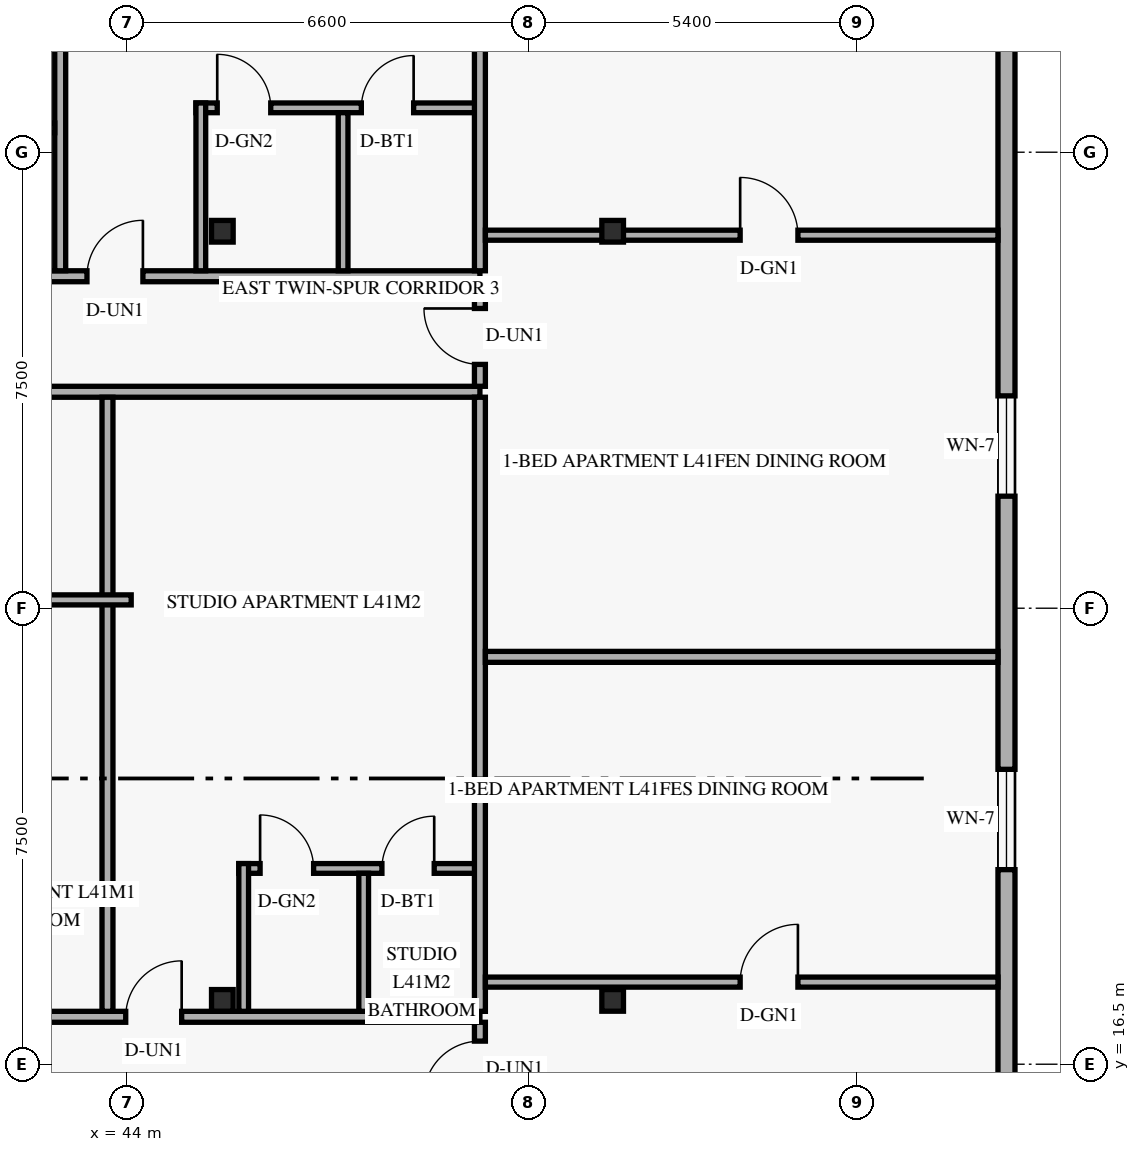
"""IFC4 building model, lengths in metres.
Left out: names, types, materials, properties, quantities, classifications, styles, units other than length and angle.
Written with IfcOpenShell. Run it as: python <this file> out.ifc"""

import sys

from ifc_helpers import new_model, si_unit, direction, frame, frame_2d, origin, origin_2d, place, context, subcontext, project, spatial, rectangle, hollow_rectangle, extrude, element, fill, save


model = new_model("IFC4")
c1 = context("Model", 3, precision=1e-05, world=origin(), true_north=direction((0.0, 1.0)))
c2 = subcontext(c1, "Body", "Model", "MODEL_VIEW")
j1 = project(units=[si_unit("LENGTHUNIT", "METRE"), si_unit("PLANEANGLEUNIT", "RADIAN")], contexts=[c1])
p1 = place(None, origin())
s1 = spatial("IfcSite", under=j1, at=p1, CompositionType="ELEMENT")
p2 = place(p1, origin())
s2 = spatial("IfcBuilding", under=s1, at=p2, CompositionType="ELEMENT")
p3 = place(p2, frame((0.0, 0.0, 159.0)))
s3 = spatial("IfcBuildingStorey", under=s2, at=p3, CompositionType="ELEMENT", Elevation=159.0)
for number, where, z_axis, x_axis in (
    (1, (45.501, 17.55, 0.0), (0.035, 0.0, 0.999), (0.0, 1.0, 0.0)),
    (2, (45.501, 30.2, 0.0), (0.035, 0.0, 0.999), (0.0, 1.0, 0.0)),
):
    element("IfcColumn", number, at=place(p3, frame(where, z_axis=z_axis, x_axis=x_axis)), inside=s3, PredefinedType="COLUMN", context=c2, shape_type="SweptSolid", body=[
        extrude(hollow_rectangle(XDim=0.356, YDim=0.356, WallThickness=0.016, at=origin_2d()), origin(), (0.0, 0.0, 1.0), 3.602),
    ])
for number, where, z_axis, x_axis in (
    (3, (51.879, 17.55, 0.0), (0.058, 0.0, 0.998), (0.0, 1.0, 0.0)),
    (4, (51.879, 30.2, 0.0), (0.058, 0.0, 0.998), (0.0, 1.0, 0.0)),
):
    element("IfcColumn", number, at=place(p3, frame(where, z_axis=z_axis, x_axis=x_axis)), inside=s3, PredefinedType="COLUMN", context=c2, shape_type="SweptSolid", body=[
        extrude(hollow_rectangle(XDim=0.356, YDim=0.356, WallThickness=0.016, at=origin_2d()), origin(), (0.0, 0.0, 1.0), 3.606),
    ])
p4 = place(p3, frame((58.46, 7.62, 0.0), z_axis=(0.0, 0.0, 1.0), x_axis=(0.0, 1.0, 0.0)))
e5 = element("IfcWall", 5, at=p4, inside=s3, PredefinedType="SOLIDWALL", context=c2, shape_type="SweptSolid", body=[
    extrude(rectangle(XDim=32.76, YDim=0.28, at=frame_2d((16.38, 0.0))), origin(), (0.0, 0.0, 1.0), 3.36),
])
p5 = place(p4, frame((4.29, 0.0, 0.85)))
e6 = element("IfcOpeningElement", 6, at=p5, cuts=e5, PredefinedType="OPENING", context=c2, shape_type="SweptSolid", body=[
    extrude(rectangle(XDim=1.65, YDim=1.6, at=frame_2d((0.825, 0.8))), frame((0.0, 0.15, 0.0), z_axis=(0.0, -1.0, 0.0), x_axis=(1.0, 0.0, 0.0)), (0.0, 0.0, 1.0), 0.3),
])
p6 = place(p4, frame((12.08, 0.0, 0.85)))
e7 = element("IfcOpeningElement", 7, at=p6, cuts=e5, PredefinedType="OPENING", context=c2, shape_type="SweptSolid", body=[
    extrude(rectangle(XDim=1.65, YDim=1.6, at=frame_2d((0.825, 0.8))), frame((0.0, 0.15, 0.0), z_axis=(0.0, -1.0, 0.0), x_axis=(1.0, 0.0, 0.0)), (0.0, 0.0, 1.0), 0.3),
])
p7 = place(p4, frame((18.223, 0.0, 0.85)))
e8 = element("IfcOpeningElement", 8, at=p7, cuts=e5, PredefinedType="OPENING", context=c2, shape_type="SweptSolid", body=[
    extrude(rectangle(XDim=1.65, YDim=1.6, at=frame_2d((0.825, 0.8))), frame((0.0, 0.15, 0.0), z_axis=(0.0, -1.0, 0.0), x_axis=(1.0, 0.0, 0.0)), (0.0, 0.0, 1.0), 0.3),
])
p8 = place(p4, frame((26.812, 0.0, 0.85)))
e9 = element("IfcOpeningElement", 9, at=p8, cuts=e5, PredefinedType="OPENING", context=c2, shape_type="SweptSolid", body=[
    extrude(rectangle(XDim=1.65, YDim=1.6, at=frame_2d((0.825, 0.8))), frame((0.0, 0.15, 0.0), z_axis=(0.0, -1.0, 0.0), x_axis=(1.0, 0.0, 0.0)), (0.0, 0.0, 1.0), 0.3),
])
p9 = place(p3, frame((37.64, 17.28, 0.0), z_axis=(0.0, 0.0, 1.0), x_axis=(1.0, 0.0, 0.0)))
e10 = element("IfcWall", 10, at=p9, inside=s3, PredefinedType="STANDARD", context=c2, shape_type="SweptSolid", body=[
    extrude(rectangle(XDim=12.16, YDim=0.18, at=frame_2d((6.08, 0.0))), origin(), (0.0, 0.0, 1.0), 2.73),
])
p10 = place(p9, frame((6.335, 0.0, 0.0)))
e11 = element("IfcOpeningElement", 11, at=p10, cuts=e10, PredefinedType="OPENING", context=c2, shape_type="SweptSolid", body=[
    extrude(rectangle(XDim=0.92, YDim=2.15, at=frame_2d((0.46, 1.075))), frame((0.0, 0.1, 0.0), z_axis=(0.0, -1.0, 0.0), x_axis=(1.0, 0.0, 0.0)), (0.0, 0.0, 1.0), 0.2),
])
p11 = place(p3, frame((37.64, 27.56, 0.0), z_axis=(0.0, 0.0, 1.0), x_axis=(1.0, 0.0, 0.0)))
e12 = element("IfcWall", 12, at=p11, inside=s3, PredefinedType="STANDARD", context=c2, shape_type="SweptSolid", body=[
    extrude(rectangle(XDim=12.16, YDim=0.18, at=frame_2d((6.08, 0.0))), origin(), (0.0, 0.0, 1.0), 2.73),
])
p12 = place(p3, frame((35.51, 29.46, 0.0), z_axis=(0.0, 0.0, 1.0), x_axis=(1.0, 0.0, 0.0)))
e13 = element("IfcWall", 13, at=p12, inside=s3, PredefinedType="STANDARD", context=c2, shape_type="SweptSolid", body=[
    extrude(rectangle(XDim=14.29, YDim=0.18, at=frame_2d((7.145, 0.0))), origin(), (0.0, 0.0, 1.0), 2.73),
])
p13 = place(p12, frame((0.35, 0.0, 0.0)))
e14 = element("IfcOpeningElement", 14, at=p13, cuts=e13, PredefinedType="OPENING", context=c2, shape_type="SweptSolid", body=[
    extrude(rectangle(XDim=0.92, YDim=2.15, at=frame_2d((0.46, 1.075))), frame((0.0, 0.1, 0.0), z_axis=(0.0, -1.0, 0.0), x_axis=(1.0, 0.0, 0.0)), (0.0, 0.0, 1.0), 0.2),
])
p14 = place(p12, frame((7.828, 0.0, 0.0)))
e15 = element("IfcOpeningElement", 15, at=p14, cuts=e13, PredefinedType="OPENING", context=c2, shape_type="SweptSolid", body=[
    extrude(rectangle(XDim=0.92, YDim=2.15, at=frame_2d((0.46, 1.075))), frame((0.0, 0.1, 0.0), z_axis=(0.0, -1.0, 0.0), x_axis=(1.0, 0.0, 0.0)), (0.0, 0.0, 1.0), 0.2),
])
p15 = place(p3, frame((42.898, 29.55, 0.0), z_axis=(0.0, 0.0, 1.0), x_axis=(0.0, 1.0, 0.0)))
e16 = element("IfcWall", 16, at=p15, inside=s3, PredefinedType="PARTITIONING", context=c2, shape_type="SweptSolid", body=[
    extrude(rectangle(XDim=14.17, YDim=0.18, at=frame_2d((7.085, 0.0))), origin(), (0.0, 0.0, 1.0), 2.73),
])
p16 = place(p3, frame((38.228, 31.9, 0.0), z_axis=(0.0, 0.0, 1.0), x_axis=(1.0, 0.0, 0.0)))
e17 = element("IfcWall", 17, at=p16, inside=s3, PredefinedType="PLUMBINGWALL", context=c2, shape_type="SweptSolid", body=[
    extrude(rectangle(XDim=4.58, YDim=0.16, at=frame_2d((2.29, 0.0))), origin(), (0.0, 0.0, 1.0), 3.36),
])
p17 = place(p16, frame((0.35, 0.0, 0.0)))
e18 = element("IfcOpeningElement", 18, at=p17, cuts=e17, PredefinedType="OPENING", context=c2, shape_type="SweptSolid", body=[
    extrude(rectangle(XDim=0.88, YDim=2.12, at=frame_2d((0.44, 1.06))), frame((0.0, 0.09, 0.0), z_axis=(0.0, -1.0, 0.0), x_axis=(1.0, 0.0, 0.0)), (0.0, 0.0, 1.0), 0.18),
])
p18 = place(p16, frame((2.72, 0.0, 0.0)))
e19 = element("IfcOpeningElement", 19, at=p18, cuts=e17, PredefinedType="OPENING", context=c2, shape_type="SweptSolid", body=[
    extrude(rectangle(XDim=0.86, YDim=2.12, at=frame_2d((0.43, 1.06))), frame((0.0, 0.09, 0.0), z_axis=(0.0, -1.0, 0.0), x_axis=(1.0, 0.0, 0.0)), (0.0, 0.0, 1.0), 0.18),
])
p19 = place(p3, frame((45.13, 32.23, 0.0), z_axis=(0.0, 0.0, 1.0), x_axis=(1.0, 0.0, 0.0)))
e20 = element("IfcWall", 20, at=p19, inside=s3, PredefinedType="PLUMBINGWALL", context=c2, shape_type="SweptSolid", body=[
    extrude(rectangle(XDim=4.67, YDim=0.16, at=frame_2d((2.335, 0.0))), origin(), (0.0, 0.0, 1.0), 2.73),
])
p20 = place(p19, frame((0.35, 0.0, 0.0)))
e21 = element("IfcOpeningElement", 21, at=p20, cuts=e20, PredefinedType="OPENING", context=c2, shape_type="SweptSolid", body=[
    extrude(rectangle(XDim=0.88, YDim=2.12, at=frame_2d((0.44, 1.06))), frame((0.0, 0.09, 0.0), z_axis=(0.0, -1.0, 0.0), x_axis=(1.0, 0.0, 0.0)), (0.0, 0.0, 1.0), 0.18),
])
p21 = place(p19, frame((2.72, 0.0, 0.0)))
e22 = element("IfcOpeningElement", 22, at=p21, cuts=e20, PredefinedType="OPENING", context=c2, shape_type="SweptSolid", body=[
    extrude(rectangle(XDim=0.86, YDim=2.12, at=frame_2d((0.43, 1.06))), frame((0.0, 0.09, 0.0), z_axis=(0.0, -1.0, 0.0), x_axis=(1.0, 0.0, 0.0)), (0.0, 0.0, 1.0), 0.18),
])
p22 = place(p3, frame((45.21, 29.55, 0.0), z_axis=(0.0, 0.0, 1.0), x_axis=(0.0, 1.0, 0.0)))
e23 = element("IfcWall", 23, at=p22, inside=s3, PredefinedType="PLUMBINGWALL", context=c2, shape_type="SweptSolid", body=[
    extrude(rectangle(XDim=2.76, YDim=0.16, at=frame_2d((1.38, 0.0))), origin(), (0.0, 0.0, 1.0), 2.73),
])
p23 = place(p3, frame((47.55, 29.55, 0.0), z_axis=(0.0, 0.0, 1.0), x_axis=(0.0, 1.0, 0.0)))
e24 = element("IfcWall", 24, at=p23, inside=s3, PredefinedType="PLUMBINGWALL", context=c2, shape_type="SweptSolid", body=[
    extrude(rectangle(XDim=2.6, YDim=0.16, at=frame_2d((1.3, 0.0))), origin(), (0.0, 0.0, 1.0), 2.73),
])
p24 = place(p3, frame((43.675, 17.37, 0.0), z_axis=(0.0, 0.0, 1.0), x_axis=(0.0, 1.0, 0.0)))
e25 = element("IfcWall", 25, at=p24, inside=s3, PredefinedType="PARTITIONING", context=c2, shape_type="SweptSolid", body=[
    extrude(rectangle(XDim=10.1, YDim=0.18, at=frame_2d((5.05, 0.0))), origin(), (0.0, 0.0, 1.0), 2.73),
])
p25 = place(p3, frame((37.64, 24.137, 0.0), z_axis=(0.0, 0.0, 1.0), x_axis=(1.0, 0.0, 0.0)))
e26 = element("IfcWall", 26, at=p25, inside=s3, PredefinedType="PARTITIONING", context=c2, shape_type="SweptSolid", body=[
    extrude(rectangle(XDim=6.425, YDim=0.165, at=frame_2d((3.212, 0.0))), origin(), (0.0, 0.0, 1.0), 3.36),
])
p26 = place(p25, frame((4.004, 0.0, 0.0)))
e27 = element("IfcOpeningElement", 27, at=p26, cuts=e26, PredefinedType="OPENING", context=c2, shape_type="SweptSolid", body=[
    extrude(rectangle(XDim=0.9, YDim=2.14, at=frame_2d((0.45, 1.07))), frame((0.0, 0.093, 0.0), z_axis=(0.0, -1.0, 0.0), x_axis=(1.0, 0.0, 0.0)), (0.0, 0.0, 1.0), 0.185),
])
p27 = place(p3, frame((45.835, 19.72, 0.0), z_axis=(0.0, 0.0, 1.0), x_axis=(1.0, 0.0, 0.0)))
e28 = element("IfcWall", 28, at=p27, inside=s3, PredefinedType="PLUMBINGWALL", context=c2, shape_type="SweptSolid", body=[
    extrude(rectangle(XDim=3.965, YDim=0.16, at=frame_2d((1.982, 0.0))), origin(), (0.0, 0.0, 1.0), 3.36),
])
p28 = place(p27, frame((0.35, 0.0, 0.0)))
e29 = element("IfcOpeningElement", 29, at=p28, cuts=e28, PredefinedType="OPENING", context=c2, shape_type="SweptSolid", body=[
    extrude(rectangle(XDim=0.88, YDim=2.12, at=frame_2d((0.44, 1.06))), frame((0.0, 0.09, 0.0), z_axis=(0.0, -1.0, 0.0), x_axis=(1.0, 0.0, 0.0)), (0.0, 0.0, 1.0), 0.18),
])
p29 = place(p27, frame((2.354, 0.0, 0.0)))
e30 = element("IfcOpeningElement", 30, at=p29, cuts=e28, PredefinedType="OPENING", context=c2, shape_type="SweptSolid", body=[
    extrude(rectangle(XDim=0.86, YDim=2.12, at=frame_2d((0.43, 1.06))), frame((0.0, 0.09, 0.0), z_axis=(0.0, -1.0, 0.0), x_axis=(1.0, 0.0, 0.0)), (0.0, 0.0, 1.0), 0.18),
])
p30 = place(p3, frame((45.915, 17.37, 0.0), z_axis=(0.0, 0.0, 1.0), x_axis=(0.0, 1.0, 0.0)))
e31 = element("IfcWall", 31, at=p30, inside=s3, PredefinedType="PLUMBINGWALL", context=c2, shape_type="SweptSolid", body=[
    extrude(rectangle(XDim=2.43, YDim=0.16, at=frame_2d((1.215, 0.0))), origin(), (0.0, 0.0, 1.0), 2.73),
])
p31 = place(p3, frame((47.888, 17.37, 0.0), z_axis=(0.0, 0.0, 1.0), x_axis=(0.0, 1.0, 0.0)))
e32 = element("IfcWall", 32, at=p31, inside=s3, PredefinedType="PLUMBINGWALL", context=c2, shape_type="SweptSolid", body=[
    extrude(rectangle(XDim=2.27, YDim=0.16, at=frame_2d((1.135, 0.0))), origin(), (0.0, 0.0, 1.0), 2.73),
])
p32 = place(p3, frame((49.8, 15.67, 0.0), z_axis=(0.0, 0.0, 1.0), x_axis=(0.0, 1.0, 0.0)))
e33 = element("IfcWall", 33, at=p32, inside=s3, PredefinedType="STANDARD", context=c2, shape_type="SweptSolid", body=[
    extrude(rectangle(XDim=1.52, YDim=0.18, at=frame_2d((0.76, 0.0))), origin(), (0.0, 0.0, 1.0), 3.36),
])
p33 = place(p32, frame((0.29, 0.0, 0.0)))
e34 = element("IfcOpeningElement", 34, at=p33, cuts=e33, PredefinedType="OPENING", context=c2, shape_type="SweptSolid", body=[
    extrude(rectangle(XDim=0.92, YDim=2.15, at=frame_2d((0.46, 1.075))), frame((0.0, 0.1, 0.0), z_axis=(0.0, -1.0, 0.0), x_axis=(1.0, 0.0, 0.0)), (0.0, 0.0, 1.0), 0.2),
])
p34 = place(p3, frame((49.8, 27.65, 0.0), z_axis=(0.0, 0.0, 1.0), x_axis=(0.0, 1.0, 0.0)))
e35 = element("IfcWall", 35, at=p34, inside=s3, PredefinedType="STANDARD", context=c2, shape_type="SweptSolid", body=[
    extrude(rectangle(XDim=1.72, YDim=0.18, at=frame_2d((0.86, 0.0))), origin(), (0.0, 0.0, 1.0), 3.36),
])
p35 = place(p34, frame((0.36, 0.0, 0.0)))
e36 = element("IfcOpeningElement", 36, at=p35, cuts=e35, PredefinedType="OPENING", context=c2, shape_type="SweptSolid", body=[
    extrude(rectangle(XDim=0.92, YDim=2.15, at=frame_2d((0.46, 1.075))), frame((0.0, 0.1, 0.0), z_axis=(0.0, -1.0, 0.0), x_axis=(1.0, 0.0, 0.0)), (0.0, 0.0, 1.0), 0.2),
])
p36 = place(p3, frame((49.8, 17.37, 0.0), z_axis=(0.0, 0.0, 1.0), x_axis=(0.0, 1.0, 0.0)))
e37 = element("IfcWall", 37, at=p36, inside=s3, PredefinedType="PARTITIONING", context=c2, shape_type="SweptSolid", body=[
    extrude(rectangle(XDim=10.1, YDim=0.18, at=frame_2d((5.05, 0.0))), origin(), (0.0, 0.0, 1.0), 2.73),
])
p37 = place(p3, frame((49.8, 29.55, 0.0), z_axis=(0.0, 0.0, 1.0), x_axis=(0.0, 1.0, 0.0)))
e38 = element("IfcWall", 38, at=p37, inside=s3, PredefinedType="PARTITIONING", context=c2, shape_type="SweptSolid", body=[
    extrude(rectangle(XDim=14.17, YDim=0.18, at=frame_2d((7.085, 0.0))), origin(), (0.0, 0.0, 1.0), 2.73),
])
p38 = place(p3, frame((49.89, 23.2, 0.0), z_axis=(0.0, 0.0, 1.0), x_axis=(1.0, 0.0, 0.0)))
e39 = element("IfcWall", 39, at=p38, inside=s3, PredefinedType="PARTITIONING", context=c2, shape_type="SweptSolid", body=[
    extrude(rectangle(XDim=8.43, YDim=0.18, at=frame_2d((4.215, 0.0))), origin(), (0.0, 0.0, 1.0), 2.879),
])
p39 = place(p3, frame((49.89, 17.851, 0.0), z_axis=(0.0, 0.0, 1.0), x_axis=(1.0, 0.0, 0.0)))
e40 = element("IfcWall", 40, at=p39, inside=s3, PredefinedType="PARTITIONING", context=c2, shape_type="SweptSolid", body=[
    extrude(rectangle(XDim=8.43, YDim=0.165, at=frame_2d((4.215, 0.0))), origin(), (0.0, 0.0, 1.0), 2.879),
])
p40 = place(p39, frame((4.19, 0.0, 0.0)))
e41 = element("IfcOpeningElement", 41, at=p40, cuts=e40, PredefinedType="OPENING", context=c2, shape_type="SweptSolid", body=[
    extrude(rectangle(XDim=0.95, YDim=2.15, at=frame_2d((0.475, 1.075))), frame((0.0, 0.093, 0.0), z_axis=(0.0, -1.0, 0.0), x_axis=(1.0, 0.0, 0.0)), (0.0, 0.0, 1.0), 0.185),
])
p41 = place(p3, frame((49.89, 30.135, 0.0), z_axis=(0.0, 0.0, 1.0), x_axis=(1.0, 0.0, 0.0)))
e42 = element("IfcWall", 42, at=p41, inside=s3, PredefinedType="PARTITIONING", context=c2, shape_type="SweptSolid", body=[
    extrude(rectangle(XDim=8.43, YDim=0.165, at=frame_2d((4.215, 0.0))), origin(), (0.0, 0.0, 1.0), 2.73),
])
p42 = place(p41, frame((4.19, 0.0, 0.0)))
e43 = element("IfcOpeningElement", 43, at=p42, cuts=e42, PredefinedType="OPENING", context=c2, shape_type="SweptSolid", body=[
    extrude(rectangle(XDim=0.95, YDim=2.15, at=frame_2d((0.475, 1.075))), frame((0.0, 0.093, 0.0), z_axis=(0.0, -1.0, 0.0), x_axis=(1.0, 0.0, 0.0)), (0.0, 0.0, 1.0), 0.185),
])
p43 = place(p6, origin())
e44 = element("IfcWindow", 44, at=p43, inside=s3, PartitioningType="SINGLE_PANEL", PredefinedType="WINDOW", context=c2, shape_type="SweptSolid", body=[
    extrude(rectangle(XDim=1.65, YDim=1.6, at=frame_2d((0.825, 0.8))), frame((0.0, 0.03, 0.0), z_axis=(0.0, -1.0, 0.0), x_axis=(1.0, 0.0, 0.0)), (0.0, 0.0, 1.0), 0.06),
])
fill(e7, e44)
p44 = place(p7, origin())
e45 = element("IfcWindow", 45, at=p44, inside=s3, PartitioningType="SINGLE_PANEL", PredefinedType="WINDOW", context=c2, shape_type="SweptSolid", body=[
    extrude(rectangle(XDim=1.65, YDim=1.6, at=frame_2d((0.825, 0.8))), frame((0.0, 0.03, 0.0), z_axis=(0.0, -1.0, 0.0), x_axis=(1.0, 0.0, 0.0)), (0.0, 0.0, 1.0), 0.06),
])
fill(e8, e45)
p45 = place(p14, origin())
e46 = element("IfcDoor", 46, at=p45, inside=s3, OperationType="SINGLE_SWING_RIGHT", PredefinedType="DOOR", context=c2, shape_type="SweptSolid", body=[
    extrude(rectangle(XDim=0.92, YDim=2.15, at=frame_2d((0.46, 1.075))), frame((0.0, 0.025, 0.0), z_axis=(0.0, -1.0, 0.0), x_axis=(1.0, 0.0, 0.0)), (0.0, 0.0, 1.0), 0.05),
])
fill(e15, e46)
p46 = place(p20, origin())
e47 = element("IfcDoor", 47, at=p46, inside=s3, OperationType="SINGLE_SWING_LEFT", PredefinedType="DOOR", context=c2, shape_type="SweptSolid", body=[
    extrude(rectangle(XDim=0.88, YDim=2.12, at=frame_2d((0.44, 1.06))), frame((0.0, 0.025, 0.0), z_axis=(0.0, -1.0, 0.0), x_axis=(1.0, 0.0, 0.0)), (0.0, 0.0, 1.0), 0.05),
])
fill(e21, e47)
p47 = place(p21, origin())
e48 = element("IfcDoor", 48, at=p47, inside=s3, OperationType="SINGLE_SWING_RIGHT", PredefinedType="DOOR", context=c2, shape_type="SweptSolid", body=[
    extrude(rectangle(XDim=0.86, YDim=2.12, at=frame_2d((0.43, 1.06))), frame((0.0, 0.025, 0.0), z_axis=(0.0, -1.0, 0.0), x_axis=(1.0, 0.0, 0.0)), (0.0, 0.0, 1.0), 0.05),
])
fill(e22, e48)
p48 = place(p10, origin())
e49 = element("IfcDoor", 49, at=p48, inside=s3, OperationType="SINGLE_SWING_RIGHT", PredefinedType="DOOR", context=c2, shape_type="SweptSolid", body=[
    extrude(rectangle(XDim=0.92, YDim=2.15, at=frame_2d((0.46, 1.075))), frame((0.0, 0.025, 0.0), z_axis=(0.0, -1.0, 0.0), x_axis=(1.0, 0.0, 0.0)), (0.0, 0.0, 1.0), 0.05),
])
fill(e11, e49)
p49 = place(p28, origin())
e50 = element("IfcDoor", 50, at=p49, inside=s3, OperationType="SINGLE_SWING_LEFT", PredefinedType="DOOR", context=c2, shape_type="SweptSolid", body=[
    extrude(rectangle(XDim=0.88, YDim=2.12, at=frame_2d((0.44, 1.06))), frame((0.0, 0.025, 0.0), z_axis=(0.0, -1.0, 0.0), x_axis=(1.0, 0.0, 0.0)), (0.0, 0.0, 1.0), 0.05),
])
fill(e29, e50)
p50 = place(p29, origin())
e51 = element("IfcDoor", 51, at=p50, inside=s3, OperationType="SINGLE_SWING_RIGHT", PredefinedType="DOOR", context=c2, shape_type="SweptSolid", body=[
    extrude(rectangle(XDim=0.86, YDim=2.12, at=frame_2d((0.43, 1.06))), frame((0.0, 0.025, 0.0), z_axis=(0.0, -1.0, 0.0), x_axis=(1.0, 0.0, 0.0)), (0.0, 0.0, 1.0), 0.05),
])
fill(e30, e51)
p51 = place(p40, origin())
e52 = element("IfcDoor", 52, at=p51, inside=s3, OperationType="SINGLE_SWING_RIGHT", PredefinedType="DOOR", context=c2, shape_type="SweptSolid", body=[
    extrude(rectangle(XDim=0.95, YDim=2.15, at=frame_2d((0.475, 1.075))), frame((0.0, 0.025, 0.0), z_axis=(0.0, -1.0, 0.0), x_axis=(1.0, 0.0, 0.0)), (0.0, 0.0, 1.0), 0.05),
])
fill(e41, e52)
p52 = place(p33, origin())
e53 = element("IfcDoor", 53, at=p52, inside=s3, OperationType="SINGLE_SWING_LEFT", PredefinedType="DOOR", context=c2, shape_type="SweptSolid", body=[
    extrude(rectangle(XDim=0.92, YDim=2.15, at=frame_2d((0.46, 1.075))), frame((0.0, 0.025, 0.0), z_axis=(0.0, -1.0, 0.0), x_axis=(1.0, 0.0, 0.0)), (0.0, 0.0, 1.0), 0.05),
])
fill(e34, e53)
p53 = place(p42, origin())
e54 = element("IfcDoor", 54, at=p53, inside=s3, OperationType="SINGLE_SWING_LEFT", PredefinedType="DOOR", context=c2, shape_type="SweptSolid", body=[
    extrude(rectangle(XDim=0.95, YDim=2.15, at=frame_2d((0.475, 1.075))), frame((0.0, 0.025, 0.0), z_axis=(0.0, -1.0, 0.0), x_axis=(1.0, 0.0, 0.0)), (0.0, 0.0, 1.0), 0.05),
])
fill(e43, e54)
p54 = place(p35, origin())
e55 = element("IfcDoor", 55, at=p54, inside=s3, OperationType="SINGLE_SWING_RIGHT", PredefinedType="DOOR", context=c2, shape_type="SweptSolid", body=[
    extrude(rectangle(XDim=0.92, YDim=2.15, at=frame_2d((0.46, 1.075))), frame((0.0, 0.025, 0.0), z_axis=(0.0, -1.0, 0.0), x_axis=(1.0, 0.0, 0.0)), (0.0, 0.0, 1.0), 0.05),
])
fill(e36, e55)
save(model, sys.argv[1])
